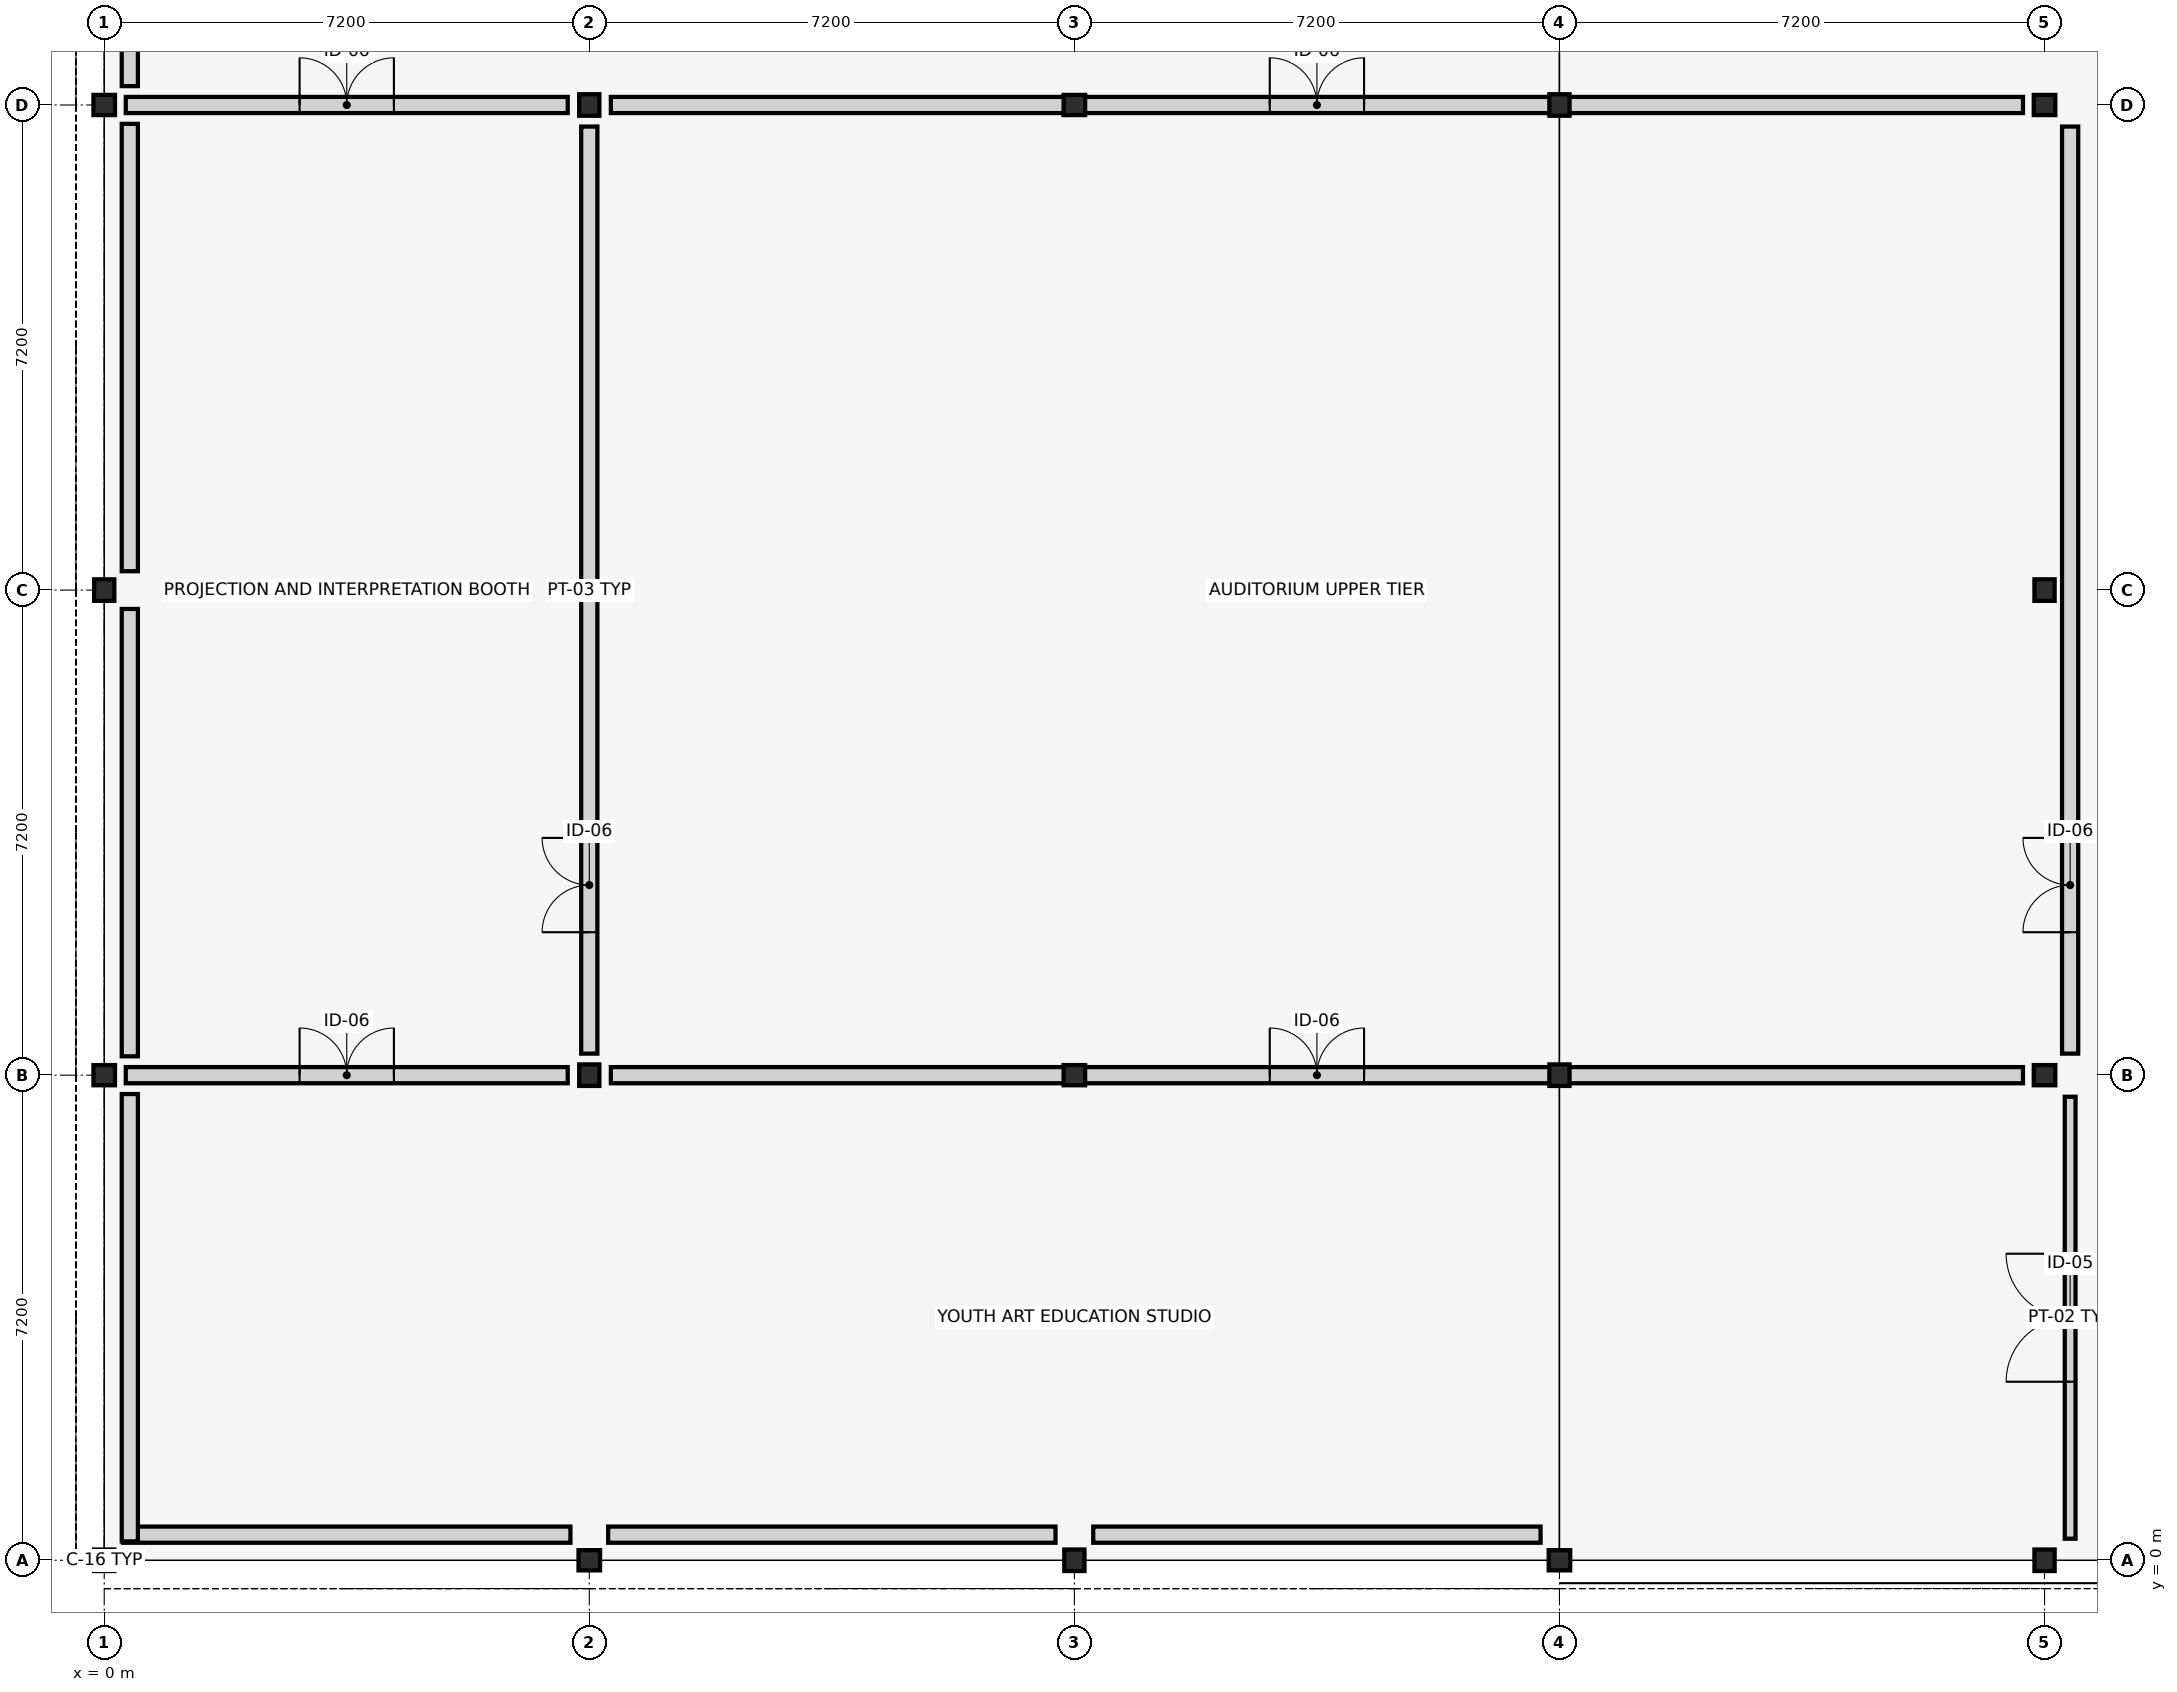
"""IFC4 building model, lengths in metres.
Left out: names, types, materials, properties, quantities, classifications, styles, units other than length and angle.
Written with IfcOpenShell. Run it as: python <this file> out.ifc"""

import sys

from ifc_helpers import new_model, si_unit, direction, frame, frame_2d, origin, origin_2d, place, context, subcontext, project, spatial, rectangle, i_section, extrude, element, fill, save


model = new_model("IFC4")
c1 = context("Model", 3, precision=1e-05, world=origin(), true_north=direction((0.0, 1.0)))
c2 = subcontext(c1, "Body", "Model", "MODEL_VIEW")
j1 = project(units=[si_unit("LENGTHUNIT", "METRE"), si_unit("PLANEANGLEUNIT", "RADIAN")], contexts=[c1])
p1 = place(None, origin())
s1 = spatial("IfcSite", under=j1, at=p1, CompositionType="ELEMENT")
p2 = place(p1, origin())
s2 = spatial("IfcBuilding", under=s1, at=p2, CompositionType="ELEMENT")
p3 = place(p2, frame((0.0, 0.0, 4.5)))
s3 = spatial("IfcBuildingStorey", under=s2, at=p3, CompositionType="ELEMENT", Elevation=4.5)
for number, where, z_axis, x_axis in (
    (1, (0.0, 0.0, 0.0), (0.0, 0.0, 1.0), (1.0, 0.0, 0.0)),
    (2, (0.0, 7.2, 0.0), (0.0, 0.0, 1.0), (0.0, 1.0, 0.0)),
    (3, (0.0, 14.4, 0.0), (0.0, 0.0, 1.0), (1.0, 0.0, 0.0)),
    (4, (0.0, 21.6, 0.0), (0.0, 0.0, 1.0), (0.0, 1.0, 0.0)),
    (5, (7.2, 0.0, 0.0), (0.0, 0.0, 1.0), (0.0, 1.0, 0.0)),
    (6, (7.2, 7.2, 0.0), (0.0, 0.0, 1.0), (1.0, 0.0, 0.0)),
    (7, (7.2, 21.6, 0.0), (0.0, 0.0, 1.0), (1.0, 0.0, 0.0)),
    (8, (14.4, 0.0, 0.0), (0.0, 0.0, 1.0), (1.0, 0.0, 0.0)),
    (9, (14.4, 7.2, 0.0), (0.0, 0.0, 1.0), (0.0, 1.0, 0.0)),
    (10, (14.4, 21.6, 0.0), (0.0, 0.0, 1.0), (0.0, 1.0, 0.0)),
    (11, (21.6, 0.0, 0.0), (0.0, 0.0, 1.0), (0.0, 1.0, 0.0)),
    (12, (21.6, 7.2, 0.0), (0.0, 0.0, 1.0), (1.0, 0.0, 0.0)),
    (13, (21.6, 21.6, 0.0), (0.0, 0.0, 1.0), (1.0, 0.0, 0.0)),
    (14, (28.8, 0.0, 0.0), (0.0, 0.0, 1.0), (1.0, 0.0, 0.0)),
    (15, (28.8, 7.2, 0.0), (0.0, 0.0, 1.0), (0.0, 1.0, 0.0)),
    (16, (28.8, 14.4, 0.0), (0.0, 0.0, 1.0), (1.0, 0.0, 0.0)),
    (17, (28.8, 21.6, 0.0), (0.0, 0.0, 1.0), (0.0, 1.0, 0.0)),
):
    element("IfcColumn", number, at=place(p3, frame(where, z_axis=z_axis, x_axis=x_axis)), inside=s3, PredefinedType="COLUMN", context=c2, shape_type="SweptSolid", body=[
        extrude(i_section(OverallWidth=0.3, OverallDepth=0.32, WebThickness=0.011, FlangeThickness=0.021, FilletRadius=0.027, at=origin_2d()), origin(), (0.0, 0.0, 1.0), 4.2),
    ])
p4 = place(p3, frame((0.28, 0.38, 0.0), z_axis=(0.0, 0.0, 1.0), x_axis=(1.0, 0.0, 0.0)))
e18 = element("IfcWall", 18, at=p4, inside=s3, PredefinedType="STANDARD", context=c2, shape_type="SweptSolid", body=[
    extrude(rectangle(XDim=6.64, YDim=0.24, at=frame_2d((3.32, 0.0))), origin(), (0.0, 0.0, 1.0), 3.58),
])
for number, where, z_axis, x_axis in (
    (19, (7.48, 0.38, 0.0), (0.0, 0.0, 1.0), (1.0, 0.0, 0.0)),
    (20, (14.68, 0.38, 0.0), (0.0, 0.0, 1.0), (1.0, 0.0, 0.0)),
    (21, (0.38, 28.52, 0.0), (0.0, 0.0, 1.0), (0.0, -1.0, 0.0)),
    (22, (0.38, 21.32, 0.0), (0.0, 0.0, 1.0), (0.0, -1.0, 0.0)),
    (23, (0.38, 14.12, 0.0), (0.0, 0.0, 1.0), (0.0, -1.0, 0.0)),
):
    element("IfcWall", number, at=place(p3, frame(where, z_axis=z_axis, x_axis=x_axis)), inside=s3, PredefinedType="STANDARD", context=c2, shape_type="SweptSolid", body=[
        extrude(rectangle(XDim=6.64, YDim=0.24, at=frame_2d((3.32, 0.0))), origin(), (0.0, 0.0, 1.0), 3.58),
    ])
p5 = place(p3, frame((0.38, 6.92, 0.0), z_axis=(0.0, 0.0, 1.0), x_axis=(0.0, -1.0, 0.0)))
e24 = element("IfcWall", 24, at=p5, inside=s3, PredefinedType="STANDARD", context=c2, shape_type="SweptSolid", body=[
    extrude(rectangle(XDim=6.64, YDim=0.24, at=frame_2d((3.32, 0.0))), origin(), (0.0, 0.0, 1.0), 3.58),
])
p6 = place(p3, frame((7.2, 7.52, 0.0), z_axis=(0.0, 0.0, 1.0), x_axis=(0.0, 1.0, 0.0)))
e25 = element("IfcWall", 25, at=p6, inside=s3, PredefinedType="PARTITIONING", context=c2, shape_type="SweptSolid", body=[
    extrude(rectangle(XDim=13.76, YDim=0.24, at=frame_2d((6.88, 0.0))), origin(), (0.0, 0.0, 1.0), 3.15),
])
p7 = place(p6, frame((1.802, 0.0, 0.0)))
e26 = element("IfcOpeningElement", 26, at=p7, cuts=e25, PredefinedType="OPENING", context=c2, shape_type="SweptSolid", body=[
    extrude(rectangle(XDim=1.4, YDim=2.3, at=frame_2d((0.7, 1.15))), frame((0.0, 0.13, 0.0), z_axis=(0.0, -1.0, 0.0), x_axis=(1.0, 0.0, 0.0)), (0.0, 0.0, 1.0), 0.26),
])
p8 = place(p3, frame((7.52, 7.2, 0.0), z_axis=(0.0, 0.0, 1.0), x_axis=(1.0, 0.0, 0.0)))
e27 = element("IfcWall", 27, at=p8, inside=s3, PredefinedType="PARTITIONING", context=c2, shape_type="SweptSolid", body=[
    extrude(rectangle(XDim=20.96, YDim=0.24, at=frame_2d((10.48, 0.0))), origin(), (0.0, 0.0, 1.0), 3.15),
])
p9 = place(p8, frame((9.78, 0.0, 0.0)))
e28 = element("IfcOpeningElement", 28, at=p9, cuts=e27, PredefinedType="OPENING", context=c2, shape_type="SweptSolid", body=[
    extrude(rectangle(XDim=1.4, YDim=2.3, at=frame_2d((0.7, 1.15))), frame((0.0, 0.13, 0.0), z_axis=(0.0, -1.0, 0.0), x_axis=(1.0, 0.0, 0.0)), (0.0, 0.0, 1.0), 0.26),
])
p10 = place(p3, frame((7.52, 21.6, 0.0), z_axis=(0.0, 0.0, 1.0), x_axis=(1.0, 0.0, 0.0)))
e29 = element("IfcWall", 29, at=p10, inside=s3, PredefinedType="PARTITIONING", context=c2, shape_type="SweptSolid", body=[
    extrude(rectangle(XDim=20.96, YDim=0.24, at=frame_2d((10.48, 0.0))), origin(), (0.0, 0.0, 1.0), 3.15),
])
p11 = place(p10, frame((9.78, 0.0, 0.0)))
e30 = element("IfcOpeningElement", 30, at=p11, cuts=e29, PredefinedType="OPENING", context=c2, shape_type="SweptSolid", body=[
    extrude(rectangle(XDim=1.4, YDim=2.3, at=frame_2d((0.7, 1.15))), frame((0.0, 0.13, 0.0), z_axis=(0.0, -1.0, 0.0), x_axis=(1.0, 0.0, 0.0)), (0.0, 0.0, 1.0), 0.26),
])
p12 = place(p3, frame((29.18, 7.52, 0.0), z_axis=(0.0, 0.0, 1.0), x_axis=(0.0, 1.0, 0.0)))
e31 = element("IfcWall", 31, at=p12, inside=s3, PredefinedType="PARTITIONING", context=c2, shape_type="SweptSolid", body=[
    extrude(rectangle(XDim=13.76, YDim=0.24, at=frame_2d((6.88, 0.0))), origin(), (0.0, 0.0, 1.0), 3.15),
])
p13 = place(p12, frame((1.802, 0.0, 0.0)))
e32 = element("IfcOpeningElement", 32, at=p13, cuts=e31, PredefinedType="OPENING", context=c2, shape_type="SweptSolid", body=[
    extrude(rectangle(XDim=1.4, YDim=2.3, at=frame_2d((0.7, 1.15))), frame((0.0, 0.13, 0.0), z_axis=(0.0, -1.0, 0.0), x_axis=(1.0, 0.0, 0.0)), (0.0, 0.0, 1.0), 0.26),
])
p14 = place(p3, frame((0.32, 7.2, 0.0), z_axis=(0.0, 0.0, 1.0), x_axis=(1.0, 0.0, 0.0)))
e33 = element("IfcWall", 33, at=p14, inside=s3, PredefinedType="PARTITIONING", context=c2, shape_type="SweptSolid", body=[
    extrude(rectangle(XDim=6.56, YDim=0.24, at=frame_2d((3.28, 0.0))), origin(), (0.0, 0.0, 1.0), 3.15),
])
p15 = place(p14, frame((2.58, 0.0, 0.0)))
e34 = element("IfcOpeningElement", 34, at=p15, cuts=e33, PredefinedType="OPENING", context=c2, shape_type="SweptSolid", body=[
    extrude(rectangle(XDim=1.4, YDim=2.3, at=frame_2d((0.7, 1.15))), frame((0.0, 0.13, 0.0), z_axis=(0.0, -1.0, 0.0), x_axis=(1.0, 0.0, 0.0)), (0.0, 0.0, 1.0), 0.26),
])
p16 = place(p3, frame((0.32, 21.6, 0.0), z_axis=(0.0, 0.0, 1.0), x_axis=(1.0, 0.0, 0.0)))
e35 = element("IfcWall", 35, at=p16, inside=s3, PredefinedType="PARTITIONING", context=c2, shape_type="SweptSolid", body=[
    extrude(rectangle(XDim=6.56, YDim=0.24, at=frame_2d((3.28, 0.0))), origin(), (0.0, 0.0, 1.0), 3.15),
])
p17 = place(p16, frame((2.58, 0.0, 0.0)))
e36 = element("IfcOpeningElement", 36, at=p17, cuts=e35, PredefinedType="OPENING", context=c2, shape_type="SweptSolid", body=[
    extrude(rectangle(XDim=1.4, YDim=2.3, at=frame_2d((0.7, 1.15))), frame((0.0, 0.13, 0.0), z_axis=(0.0, -1.0, 0.0), x_axis=(1.0, 0.0, 0.0)), (0.0, 0.0, 1.0), 0.26),
])
p18 = place(p3, frame((29.18, 0.32, 0.0), z_axis=(0.0, 0.0, 1.0), x_axis=(0.0, 1.0, 0.0)))
e37 = element("IfcWall", 37, at=p18, inside=s3, PredefinedType="PARTITIONING", context=c2, shape_type="SweptSolid", body=[
    extrude(rectangle(XDim=6.56, YDim=0.16, at=frame_2d((3.28, 0.0))), origin(), (0.0, 0.0, 1.0), 3.15),
])
p19 = place(p18, frame((2.33, 0.0, 0.0)))
e38 = element("IfcOpeningElement", 38, at=p19, cuts=e37, PredefinedType="OPENING", context=c2, shape_type="SweptSolid", body=[
    extrude(rectangle(XDim=1.9, YDim=2.45, at=frame_2d((0.95, 1.225))), frame((0.0, 0.09, 0.0), z_axis=(0.0, -1.0, 0.0), x_axis=(1.0, 0.0, 0.0)), (0.0, 0.0, 1.0), 0.18),
])
p20 = place(p7, origin())
e39 = element("IfcDoor", 39, at=p20, inside=s3, OperationType="DOUBLE_DOOR_SINGLE_SWING", PredefinedType="DOOR", context=c2, shape_type="SweptSolid", body=[
    extrude(rectangle(XDim=1.4, YDim=2.3, at=frame_2d((0.7, 1.15))), frame((0.0, 0.025, 0.0), z_axis=(0.0, -1.0, 0.0), x_axis=(1.0, 0.0, 0.0)), (0.0, 0.0, 1.0), 0.05),
])
fill(e26, e39)
p21 = place(p9, origin())
e40 = element("IfcDoor", 40, at=p21, inside=s3, OperationType="DOUBLE_DOOR_SINGLE_SWING", PredefinedType="DOOR", context=c2, shape_type="SweptSolid", body=[
    extrude(rectangle(XDim=1.4, YDim=2.3, at=frame_2d((0.7, 1.15))), frame((0.0, 0.025, 0.0), z_axis=(0.0, -1.0, 0.0), x_axis=(1.0, 0.0, 0.0)), (0.0, 0.0, 1.0), 0.05),
])
fill(e28, e40)
p22 = place(p11, origin())
e41 = element("IfcDoor", 41, at=p22, inside=s3, OperationType="DOUBLE_DOOR_SINGLE_SWING", PredefinedType="DOOR", context=c2, shape_type="SweptSolid", body=[
    extrude(rectangle(XDim=1.4, YDim=2.3, at=frame_2d((0.7, 1.15))), frame((0.0, 0.025, 0.0), z_axis=(0.0, -1.0, 0.0), x_axis=(1.0, 0.0, 0.0)), (0.0, 0.0, 1.0), 0.05),
])
fill(e30, e41)
p23 = place(p13, origin())
e42 = element("IfcDoor", 42, at=p23, inside=s3, OperationType="DOUBLE_DOOR_SINGLE_SWING", PredefinedType="DOOR", context=c2, shape_type="SweptSolid", body=[
    extrude(rectangle(XDim=1.4, YDim=2.3, at=frame_2d((0.7, 1.15))), frame((0.0, 0.025, 0.0), z_axis=(0.0, -1.0, 0.0), x_axis=(1.0, 0.0, 0.0)), (0.0, 0.0, 1.0), 0.05),
])
fill(e32, e42)
p24 = place(p15, origin())
e43 = element("IfcDoor", 43, at=p24, inside=s3, OperationType="DOUBLE_DOOR_SINGLE_SWING", PredefinedType="DOOR", context=c2, shape_type="SweptSolid", body=[
    extrude(rectangle(XDim=1.4, YDim=2.3, at=frame_2d((0.7, 1.15))), frame((0.0, 0.025, 0.0), z_axis=(0.0, -1.0, 0.0), x_axis=(1.0, 0.0, 0.0)), (0.0, 0.0, 1.0), 0.05),
])
fill(e34, e43)
p25 = place(p17, origin())
e44 = element("IfcDoor", 44, at=p25, inside=s3, OperationType="DOUBLE_DOOR_SINGLE_SWING", PredefinedType="DOOR", context=c2, shape_type="SweptSolid", body=[
    extrude(rectangle(XDim=1.4, YDim=2.3, at=frame_2d((0.7, 1.15))), frame((0.0, 0.025, 0.0), z_axis=(0.0, -1.0, 0.0), x_axis=(1.0, 0.0, 0.0)), (0.0, 0.0, 1.0), 0.05),
])
fill(e36, e44)
p26 = place(p19, origin())
e45 = element("IfcDoor", 45, at=p26, inside=s3, OperationType="DOUBLE_DOOR_SINGLE_SWING", PredefinedType="DOOR", context=c2, shape_type="SweptSolid", body=[
    extrude(rectangle(XDim=1.9, YDim=2.45, at=frame_2d((0.95, 1.225))), frame((0.0, 0.025, 0.0), z_axis=(0.0, -1.0, 0.0), x_axis=(1.0, 0.0, 0.0)), (0.0, 0.0, 1.0), 0.05),
])
fill(e38, e45)
save(model, sys.argv[1])
